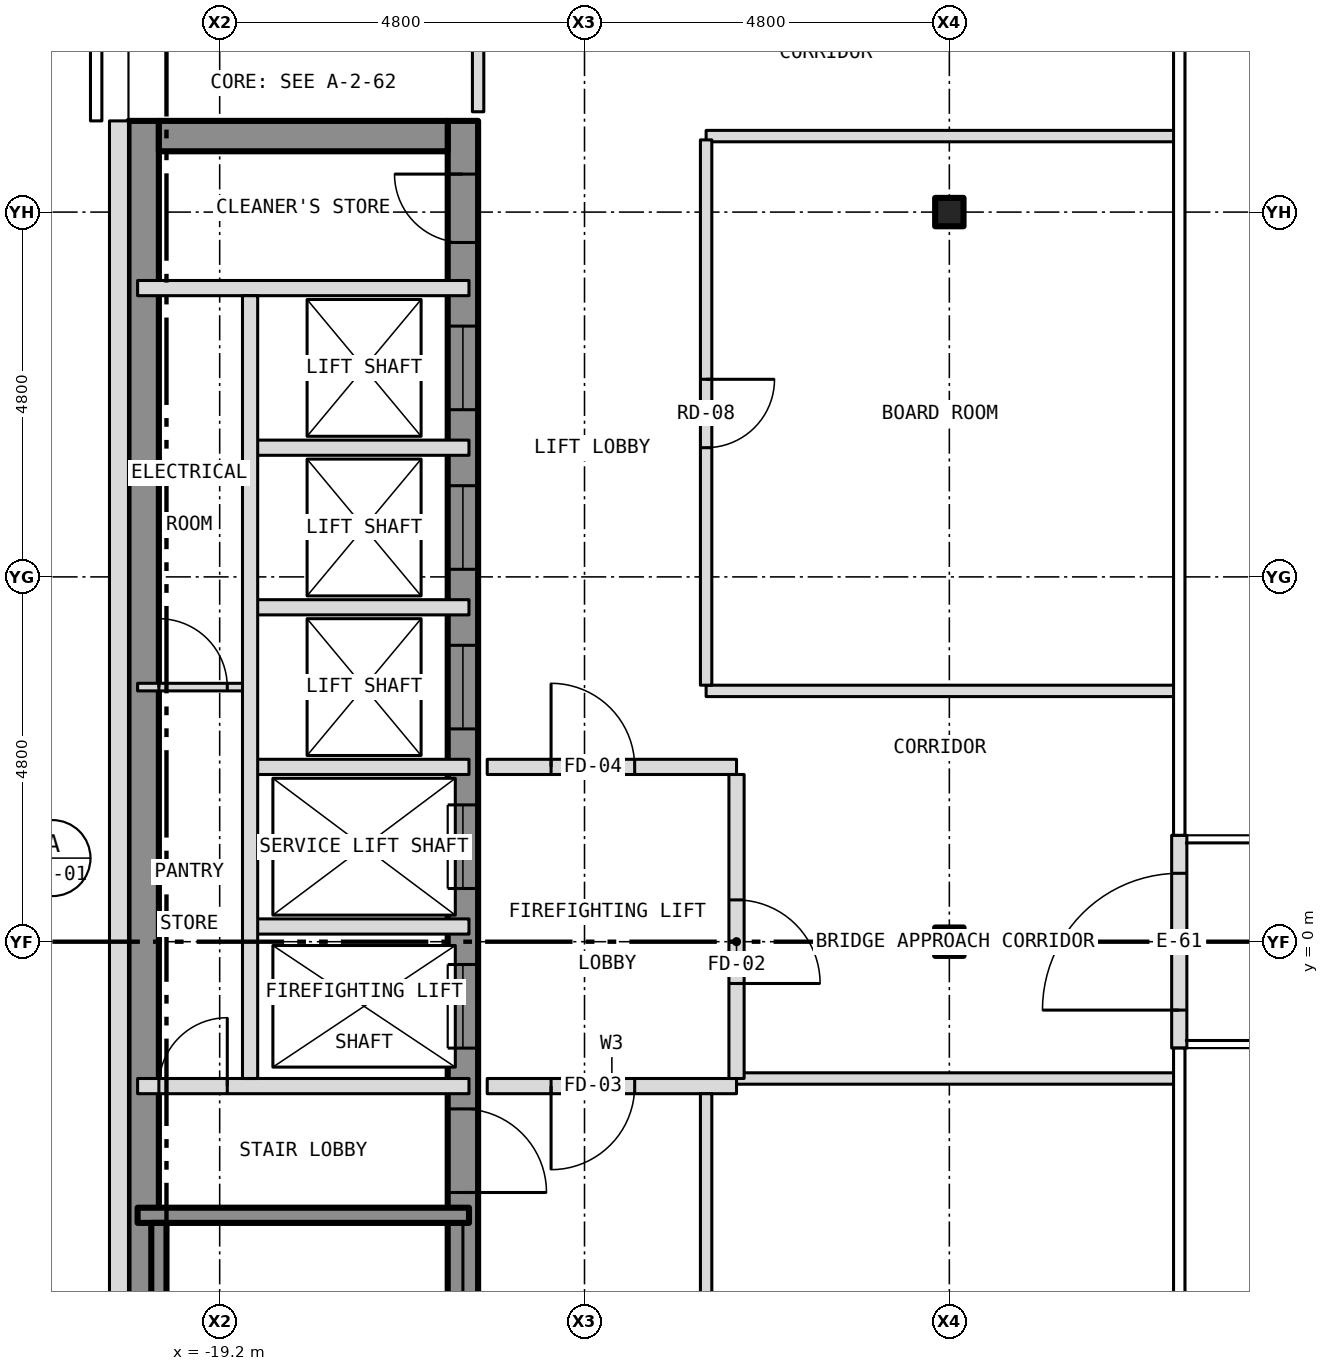
"""IFC4 building model, lengths in metres.
Left out: names, types, materials, properties, quantities, classifications, styles, units other than length and angle.
Written with IfcOpenShell. Run it as: python <this file> out.ifc"""

import sys

from ifc_helpers import new_model, si_unit, direction, frame, frame_2d, origin, origin_2d, place, context, subcontext, project, spatial, rectangle, i_section, extrude, element, fill, save


model = new_model("IFC4")
c1 = context("Model", 3, precision=1e-05, world=origin(), true_north=direction((0.0, 1.0)))
c2 = subcontext(c1, "Body", "Model", "MODEL_VIEW")
j1 = project(units=[si_unit("LENGTHUNIT", "METRE"), si_unit("PLANEANGLEUNIT", "RADIAN")], contexts=[c1])
p1 = place(None, origin())
s1 = spatial("IfcSite", under=j1, at=p1, CompositionType="ELEMENT")
p2 = place(p1, origin())
s2 = spatial("IfcBuilding", under=s1, at=p2, CompositionType="ELEMENT")
p3 = place(p2, frame((0.0, 0.0, 226.0)))
s3 = spatial("IfcBuildingStorey", under=s2, at=p3, CompositionType="ELEMENT", Elevation=226.0)
for number, where, z_axis, x_axis in (
    (1, (-9.6, 0.0, -0.15), (0.0, 0.0, 1.0), (1.0, 0.0, 0.0)),
    (2, (-9.6, 9.6, -0.15), (0.0, 0.0, 1.0), (1.0, 0.0, 0.0)),
):
    element("IfcColumn", number, at=place(p3, frame(where, z_axis=z_axis, x_axis=x_axis)), inside=s3, PredefinedType="COLUMN", context=c2, shape_type="SweptSolid", body=[
        extrude(i_section(OverallWidth=0.373, OverallDepth=0.373, WebThickness=0.016, FlangeThickness=0.026, at=origin_2d()), origin(), (0.0, 0.0, 1.0), 3.5),
    ])
p4 = place(p3, frame((-16.0, -10.8, 0.0), z_axis=(0.0, 0.0, 1.0), x_axis=(0.0, 1.0, 0.0)))
e3 = element("IfcWall", 3, at=p4, inside=s3, PredefinedType="SHEAR", context=c2, shape_type="SweptSolid", body=[
    extrude(rectangle(XDim=21.6, YDim=0.4, at=frame_2d((10.8, 0.0))), origin(), (0.0, 0.0, 1.0), 3.25),
])
p5 = place(p4, frame((9.4, 0.0, 0.0)))
e4 = element("IfcOpeningElement", 4, at=p5, cuts=e3, PredefinedType="OPENING", context=c2, shape_type="SweptSolid", body=[
    extrude(rectangle(XDim=1.1, YDim=2.1, at=frame_2d((0.55, 1.05))), frame((0.0, 0.212, 0.0), z_axis=(0.0, -1.0, 0.0), x_axis=(1.0, 0.0, 0.0)), (0.0, 0.0, 1.0), 0.424),
])
p6 = place(p4, frame((11.5, 0.0, 0.0)))
e5 = element("IfcOpeningElement", 5, at=p6, cuts=e3, PredefinedType="OPENING", context=c2, shape_type="SweptSolid", body=[
    extrude(rectangle(XDim=1.1, YDim=2.1, at=frame_2d((0.55, 1.05))), frame((0.0, 0.212, 0.0), z_axis=(0.0, -1.0, 0.0), x_axis=(1.0, 0.0, 0.0)), (0.0, 0.0, 1.0), 0.424),
])
p7 = place(p4, frame((13.6, 0.0, 0.0)))
e6 = element("IfcOpeningElement", 6, at=p7, cuts=e3, PredefinedType="OPENING", context=c2, shape_type="SweptSolid", body=[
    extrude(rectangle(XDim=1.1, YDim=2.1, at=frame_2d((0.55, 1.05))), frame((0.0, 0.212, 0.0), z_axis=(0.0, -1.0, 0.0), x_axis=(1.0, 0.0, 0.0)), (0.0, 0.0, 1.0), 0.424),
])
p8 = place(p4, frame((15.7, 0.0, 0.0)))
e7 = element("IfcOpeningElement", 7, at=p8, cuts=e3, PredefinedType="OPENING", context=c2, shape_type="SweptSolid", body=[
    extrude(rectangle(XDim=1.1, YDim=2.1, at=frame_2d((0.55, 1.05))), frame((0.0, 0.212, 0.0), z_axis=(0.0, -1.0, 0.0), x_axis=(1.0, 0.0, 0.0)), (0.0, 0.0, 1.0), 0.424),
])
p9 = place(p4, frame((17.8, 0.0, 0.0)))
e8 = element("IfcOpeningElement", 8, at=p9, cuts=e3, PredefinedType="OPENING", context=c2, shape_type="SweptSolid", body=[
    extrude(rectangle(XDim=1.1, YDim=2.1, at=frame_2d((0.55, 1.05))), frame((0.0, 0.212, 0.0), z_axis=(0.0, -1.0, 0.0), x_axis=(1.0, 0.0, 0.0)), (0.0, 0.0, 1.0), 0.424),
])
p10 = place(p4, frame((0.458, 0.0, 0.0)))
e9 = element("IfcOpeningElement", 9, at=p10, cuts=e3, PredefinedType="OPENING", context=c2, shape_type="SweptSolid", body=[
    extrude(rectangle(XDim=1.1, YDim=2.1, at=frame_2d((0.55, 1.05))), frame((0.0, 0.212, 0.0), z_axis=(0.0, -1.0, 0.0), x_axis=(1.0, 0.0, 0.0)), (0.0, 0.0, 1.0), 0.424),
])
p11 = place(p4, frame((7.5, 0.0, 0.0)))
e10 = element("IfcOpeningElement", 10, at=p11, cuts=e3, PredefinedType="OPENING", context=c2, shape_type="SweptSolid", body=[
    extrude(rectangle(XDim=1.1, YDim=2.1, at=frame_2d((0.55, 1.05))), frame((0.0, 0.212, 0.0), z_axis=(0.0, -1.0, 0.0), x_axis=(1.0, 0.0, 0.0)), (0.0, 0.0, 1.0), 0.424),
])
p12 = place(p4, frame((20.0, 0.0, 0.0)))
e11 = element("IfcOpeningElement", 11, at=p12, cuts=e3, PredefinedType="OPENING", context=c2, shape_type="SweptSolid", body=[
    extrude(rectangle(XDim=0.9, YDim=2.1, at=frame_2d((0.45, 1.05))), frame((0.0, 0.212, 0.0), z_axis=(0.0, -1.0, 0.0), x_axis=(1.0, 0.0, 0.0)), (0.0, 0.0, 1.0), 0.424),
])
p13 = place(p3, frame((-20.2, -10.8, 0.0), z_axis=(0.0, 0.0, 1.0), x_axis=(0.0, 1.0, 0.0)))
e12 = element("IfcWall", 12, at=p13, inside=s3, PredefinedType="SHEAR", context=c2, shape_type="SweptSolid", body=[
    extrude(rectangle(XDim=21.6, YDim=0.4, at=frame_2d((10.8, 0.0))), origin(), (0.0, 0.0, 1.0), 3.25),
])
p14 = place(p3, frame((-20.0, 10.6, 0.0), z_axis=(0.0, 0.0, 1.0), x_axis=(1.0, 0.0, 0.0)))
e13 = element("IfcWall", 13, at=p14, inside=s3, PredefinedType="SHEAR", context=c2, shape_type="SweptSolid", body=[
    extrude(rectangle(XDim=3.8, YDim=0.4, at=frame_2d((1.9, 0.0))), origin(), (0.0, 0.0, 1.0), 3.25),
])
p15 = place(p3, frame((-20.525, 10.8, 0.0), z_axis=(0.0, 0.0, 1.0), x_axis=(0.0, -1.0, 0.0)))
e14 = element("IfcWall", 14, at=p15, inside=s3, PredefinedType="SOLIDWALL", context=c2, shape_type="SweptSolid", body=[
    extrude(rectangle(XDim=21.6, YDim=0.25, at=frame_2d((10.8, 0.0))), origin(), (0.0, 0.0, 1.0), 3.5),
])
p16 = place(p15, frame((18.05, 0.0, 1.0)))
e15 = element("IfcOpeningElement", 15, at=p16, cuts=e14, PredefinedType="OPENING", context=c2, shape_type="SweptSolid", body=[
    extrude(rectangle(XDim=0.6, YDim=1.5, at=frame_2d((0.3, 0.75))), frame((0.0, 0.137, 0.0), z_axis=(0.0, -1.0, 0.0), x_axis=(1.0, 0.0, 0.0)), (0.0, 0.0, 1.0), 0.274),
])
p17 = place(p3, frame((-6.575, -1.4, 0.0), z_axis=(0.0, 0.0, 1.0), x_axis=(0.0, 1.0, 0.0)))
e16 = element("IfcWall", 16, at=p17, inside=s3, PredefinedType="SOLIDWALL", context=c2, shape_type="SweptSolid", body=[
    extrude(rectangle(XDim=2.8, YDim=0.2, at=frame_2d((1.4, 0.0))), origin(), (0.0, 0.0, 1.0), 3.5),
])
p18 = place(p17, frame((0.5, 0.0, 0.0)))
e17 = element("IfcOpeningElement", 17, at=p18, cuts=e16, PredefinedType="OPENING", context=c2, shape_type="SweptSolid", body=[
    extrude(rectangle(XDim=1.8, YDim=2.1, at=frame_2d((0.9, 1.05))), frame((0.0, 0.112, 0.0), z_axis=(0.0, -1.0, 0.0), x_axis=(1.0, 0.0, 0.0)), (0.0, 0.0, 1.0), 0.224),
])
p19 = place(p3, frame((-20.28, -3.6, 0.0), z_axis=(0.0, 0.0, 1.0), x_axis=(1.0, 0.0, 0.0)))
e18 = element("IfcWall", 18, at=p19, inside=s3, PredefinedType="SHEAR", context=c2, shape_type="SweptSolid", body=[
    extrude(rectangle(XDim=4.36, YDim=0.2, at=frame_2d((2.18, 0.0))), origin(), (0.0, 0.0, 1.0), 3.25),
])
p20 = place(p3, frame((-20.28, -1.9, 0.0), z_axis=(0.0, 0.0, 1.0), x_axis=(1.0, 0.0, 0.0)))
e19 = element("IfcWall", 19, at=p20, inside=s3, PredefinedType="PARTITIONING", context=c2, shape_type="SweptSolid", body=[
    extrude(rectangle(XDim=4.36, YDim=0.2, at=frame_2d((2.18, 0.0))), origin(), (0.0, 0.0, 1.0), 3.25),
])
p21 = place(p20, frame((0.28, 0.0, 0.0)))
e20 = element("IfcOpeningElement", 20, at=p21, cuts=e19, PredefinedType="OPENING", context=c2, shape_type="SweptSolid", body=[
    extrude(rectangle(XDim=0.9, YDim=2.1, at=frame_2d((0.45, 1.05))), frame((0.0, 0.112, 0.0), z_axis=(0.0, -1.0, 0.0), x_axis=(1.0, 0.0, 0.0)), (0.0, 0.0, 1.0), 0.224),
])
p22 = place(p3, frame((-15.68, -1.9, 0.0), z_axis=(0.0, 0.0, 1.0), x_axis=(1.0, 0.0, 0.0)))
e21 = element("IfcWall", 21, at=p22, inside=s3, PredefinedType="PARTITIONING", context=c2, shape_type="SweptSolid", body=[
    extrude(rectangle(XDim=3.28, YDim=0.2, at=frame_2d((1.64, 0.0))), origin(), (0.0, 0.0, 1.0), 3.35),
])
p23 = place(p22, frame((0.84, 0.0, 0.0)))
e22 = element("IfcOpeningElement", 22, at=p23, cuts=e21, PredefinedType="OPENING", context=c2, shape_type="SweptSolid", body=[
    extrude(rectangle(XDim=1.1, YDim=2.1, at=frame_2d((0.55, 1.05))), frame((0.0, 0.112, 0.0), z_axis=(0.0, -1.0, 0.0), x_axis=(1.0, 0.0, 0.0)), (0.0, 0.0, 1.0), 0.224),
])
p24 = place(p3, frame((-12.4, -1.8, 0.0), z_axis=(0.0, 0.0, 1.0), x_axis=(1.0, 0.0, 0.0)))
e23 = element("IfcWall", 23, at=p24, inside=s3, PredefinedType="PARTITIONING", context=c2, shape_type="SweptSolid", body=[
    extrude(rectangle(XDim=5.78, YDim=0.15, at=frame_2d((2.89, 0.0))), origin(), (0.0, 0.0, 1.0), 3.35),
])
for number, where, z_axis, x_axis in (
    (24, (-18.8, 0.2, 0.0), (0.0, 0.0, 1.0), (1.0, 0.0, 0.0)),
    (25, (-18.8, 2.3, 0.0), (0.0, 0.0, 1.0), (1.0, 0.0, 0.0)),
):
    element("IfcWall", number, at=place(p3, frame(where, z_axis=z_axis, x_axis=x_axis)), inside=s3, PredefinedType="PARTITIONING", context=c2, shape_type="SweptSolid", body=[
        extrude(rectangle(XDim=2.88, YDim=0.2, at=frame_2d((1.44, 0.0))), origin(), (0.0, 0.0, 1.0), 3.25),
    ])
p25 = place(p3, frame((-15.68, 2.3, 0.0), z_axis=(0.0, 0.0, 1.0), x_axis=(1.0, 0.0, 0.0)))
e26 = element("IfcWall", 26, at=p25, inside=s3, PredefinedType="PARTITIONING", context=c2, shape_type="SweptSolid", body=[
    extrude(rectangle(XDim=3.28, YDim=0.2, at=frame_2d((1.64, 0.0))), origin(), (0.0, 0.0, 1.0), 3.35),
])
p26 = place(p25, frame((0.84, 0.0, 0.0)))
e27 = element("IfcOpeningElement", 27, at=p26, cuts=e26, PredefinedType="OPENING", context=c2, shape_type="SweptSolid", body=[
    extrude(rectangle(XDim=1.1, YDim=2.1, at=frame_2d((0.55, 1.05))), frame((0.0, 0.112, 0.0), z_axis=(0.0, -1.0, 0.0), x_axis=(1.0, 0.0, 0.0)), (0.0, 0.0, 1.0), 0.224),
])
p27 = place(p3, frame((-12.8, 3.3, 0.0), z_axis=(0.0, 0.0, 1.0), x_axis=(1.0, 0.0, 0.0)))
e28 = element("IfcWall", 28, at=p27, inside=s3, PredefinedType="PARTITIONING", context=c2, shape_type="SweptSolid", body=[
    extrude(rectangle(XDim=6.18, YDim=0.15, at=frame_2d((3.09, 0.0))), origin(), (0.0, 0.0, 1.0), 3.35),
])
p28 = place(p3, frame((-20.28, 3.35, 0.0), z_axis=(0.0, 0.0, 1.0), x_axis=(1.0, 0.0, 0.0)))
e29 = element("IfcWall", 29, at=p28, inside=s3, PredefinedType="PARTITIONING", context=c2, shape_type="SweptSolid", body=[
    extrude(rectangle(XDim=1.48, YDim=0.1, at=frame_2d((0.74, 0.0))), origin(), (0.0, 0.0, 1.0), 3.25),
])
p29 = place(p28, frame((0.28, 0.0, 0.0)))
e30 = element("IfcOpeningElement", 30, at=p29, cuts=e29, PredefinedType="OPENING", context=c2, shape_type="SweptSolid", body=[
    extrude(rectangle(XDim=0.9, YDim=2.1, at=frame_2d((0.45, 1.05))), frame((0.0, 0.062, 0.0), z_axis=(0.0, -1.0, 0.0), x_axis=(1.0, 0.0, 0.0)), (0.0, 0.0, 1.0), 0.124),
])
for number, where, z_axis, x_axis in (
    (31, (-18.8, 4.4, 0.0), (0.0, 0.0, 1.0), (1.0, 0.0, 0.0)),
    (32, (-18.8, 6.5, 0.0), (0.0, 0.0, 1.0), (1.0, 0.0, 0.0)),
):
    element("IfcWall", number, at=place(p3, frame(where, z_axis=z_axis, x_axis=x_axis)), inside=s3, PredefinedType="PARTITIONING", context=c2, shape_type="SweptSolid", body=[
        extrude(rectangle(XDim=2.88, YDim=0.2, at=frame_2d((1.44, 0.0))), origin(), (0.0, 0.0, 1.0), 3.25),
    ])
p30 = place(p3, frame((-20.28, 8.6, 0.0), z_axis=(0.0, 0.0, 1.0), x_axis=(1.0, 0.0, 0.0)))
e33 = element("IfcWall", 33, at=p30, inside=s3, PredefinedType="PARTITIONING", context=c2, shape_type="SweptSolid", body=[
    extrude(rectangle(XDim=4.36, YDim=0.2, at=frame_2d((2.18, 0.0))), origin(), (0.0, 0.0, 1.0), 3.25),
])
p31 = place(p3, frame((-12.8, 10.6, 0.0), z_axis=(0.0, 0.0, 1.0), x_axis=(1.0, 0.0, 0.0)))
e34 = element("IfcWall", 34, at=p31, inside=s3, PredefinedType="PARTITIONING", context=c2, shape_type="SweptSolid", body=[
    extrude(rectangle(XDim=6.18, YDim=0.15, at=frame_2d((3.09, 0.0))), origin(), (0.0, 0.0, 1.0), 3.35),
])
p32 = place(p3, frame((-20.0, -10.68, 0.0), z_axis=(0.0, 0.0, 1.0), x_axis=(0.0, 1.0, 0.0)))
e35 = element("IfcWall", 35, at=p32, inside=s3, PredefinedType="SHEAR", context=c2, shape_type="SweptSolid", body=[
    extrude(rectangle(XDim=6.98, YDim=0.2, at=frame_2d((3.49, 0.0))), origin(), (0.0, 0.0, 1.0), 3.25),
])
p33 = place(p3, frame((-18.8, -1.8, 0.0), z_axis=(0.0, 0.0, 1.0), x_axis=(0.0, 1.0, 0.0)))
e36 = element("IfcWall", 36, at=p33, inside=s3, PredefinedType="PARTITIONING", context=c2, shape_type="SweptSolid", body=[
    extrude(rectangle(XDim=10.3, YDim=0.2, at=frame_2d((5.15, 0.0))), origin(), (0.0, 0.0, 1.0), 3.25),
])
p34 = place(p3, frame((-15.8, 10.92, 0.0), z_axis=(0.0, 0.0, 1.0), x_axis=(0.0, 1.0, 0.0)))
e37 = element("IfcWall", 37, at=p34, inside=s3, PredefinedType="PARTITIONING", context=c2, shape_type="SweptSolid", body=[
    extrude(rectangle(XDim=1.805, YDim=0.15, at=frame_2d((0.903, 0.0))), origin(), (0.0, 0.0, 1.0), 3.35),
])
p35 = place(p3, frame((-12.8, -10.525, 0.0), z_axis=(0.0, 0.0, 1.0), x_axis=(0.0, 1.0, 0.0)))
e38 = element("IfcWall", 38, at=p35, inside=s3, PredefinedType="PARTITIONING", context=c2, shape_type="SweptSolid", body=[
    extrude(rectangle(XDim=8.525, YDim=0.15, at=frame_2d((4.262, 0.0))), origin(), (0.0, 0.0, 1.0), 3.35),
])
p36 = place(p35, frame((3.825, 0.0, 0.0)))
e39 = element("IfcOpeningElement", 39, at=p36, cuts=e38, PredefinedType="OPENING", context=c2, shape_type="SweptSolid", body=[
    extrude(rectangle(XDim=0.9, YDim=2.1, at=frame_2d((0.45, 1.05))), frame((0.0, 0.087, 0.0), z_axis=(0.0, -1.0, 0.0), x_axis=(1.0, 0.0, 0.0)), (0.0, 0.0, 1.0), 0.174),
])
p37 = place(p3, frame((-12.8, 3.375, 0.0), z_axis=(0.0, 0.0, 1.0), x_axis=(0.0, 1.0, 0.0)))
e40 = element("IfcWall", 40, at=p37, inside=s3, PredefinedType="PARTITIONING", context=c2, shape_type="SweptSolid", body=[
    extrude(rectangle(XDim=7.175, YDim=0.15, at=frame_2d((3.587, 0.0))), origin(), (0.0, 0.0, 1.0), 3.35),
])
p38 = place(p37, frame((3.125, 0.0, 0.0)))
e41 = element("IfcOpeningElement", 41, at=p38, cuts=e40, PredefinedType="OPENING", context=c2, shape_type="SweptSolid", body=[
    extrude(rectangle(XDim=0.9, YDim=2.1, at=frame_2d((0.45, 1.05))), frame((0.0, 0.087, 0.0), z_axis=(0.0, -1.0, 0.0), x_axis=(1.0, 0.0, 0.0)), (0.0, 0.0, 1.0), 0.174),
])
p39 = place(p3, frame((-12.4, -1.8, 0.0), z_axis=(0.0, 0.0, 1.0), x_axis=(0.0, 1.0, 0.0)))
e42 = element("IfcWall", 42, at=p39, inside=s3, PredefinedType="PARTITIONING", context=c2, shape_type="SweptSolid", body=[
    extrude(rectangle(XDim=4.0, YDim=0.2, at=frame_2d((2.0, 0.0))), origin(), (0.0, 0.0, 1.0), 3.35),
])
p40 = place(p39, frame((1.25, 0.0, 0.0)))
e43 = element("IfcOpeningElement", 43, at=p40, cuts=e42, PredefinedType="OPENING", context=c2, shape_type="SweptSolid", body=[
    extrude(rectangle(XDim=1.1, YDim=2.1, at=frame_2d((0.55, 1.05))), frame((0.0, 0.112, 0.0), z_axis=(0.0, -1.0, 0.0), x_axis=(1.0, 0.0, 0.0)), (0.0, 0.0, 1.0), 0.224),
])
p41 = place(p18, origin())
e44 = element("IfcDoor", 44, at=p41, inside=s3, OperationType="DOUBLE_DOOR_DOUBLE_SWING", PredefinedType="DOOR", context=c2, shape_type="SweptSolid", body=[
    extrude(rectangle(XDim=1.8, YDim=2.1, at=frame_2d((0.9, 1.05))), frame((0.0, 0.025, 0.0), z_axis=(0.0, -1.0, 0.0), x_axis=(1.0, 0.0, 0.0)), (0.0, 0.0, 1.0), 0.05),
])
fill(e17, e44)
p42 = place(p5, origin())
e45 = element("IfcDoor", 45, at=p42, inside=s3, OperationType="SLIDING_TO_LEFT", PredefinedType="DOOR", context=c2, shape_type="SweptSolid", body=[
    extrude(rectangle(XDim=1.1, YDim=2.1, at=frame_2d((0.55, 1.05))), frame((0.0, 0.025, 0.0), z_axis=(0.0, -1.0, 0.0), x_axis=(1.0, 0.0, 0.0)), (0.0, 0.0, 1.0), 0.05),
])
fill(e4, e45)
p43 = place(p6, origin())
e46 = element("IfcDoor", 46, at=p43, inside=s3, OperationType="SLIDING_TO_LEFT", PredefinedType="DOOR", context=c2, shape_type="SweptSolid", body=[
    extrude(rectangle(XDim=1.1, YDim=2.1, at=frame_2d((0.55, 1.05))), frame((0.0, 0.025, 0.0), z_axis=(0.0, -1.0, 0.0), x_axis=(1.0, 0.0, 0.0)), (0.0, 0.0, 1.0), 0.05),
])
fill(e5, e46)
p44 = place(p7, origin())
e47 = element("IfcDoor", 47, at=p44, inside=s3, OperationType="SLIDING_TO_LEFT", PredefinedType="DOOR", context=c2, shape_type="SweptSolid", body=[
    extrude(rectangle(XDim=1.1, YDim=2.1, at=frame_2d((0.55, 1.05))), frame((0.0, 0.025, 0.0), z_axis=(0.0, -1.0, 0.0), x_axis=(1.0, 0.0, 0.0)), (0.0, 0.0, 1.0), 0.05),
])
fill(e6, e47)
p45 = place(p8, origin())
e48 = element("IfcDoor", 48, at=p45, inside=s3, OperationType="SLIDING_TO_LEFT", PredefinedType="DOOR", context=c2, shape_type="SweptSolid", body=[
    extrude(rectangle(XDim=1.1, YDim=2.1, at=frame_2d((0.55, 1.05))), frame((0.0, 0.025, 0.0), z_axis=(0.0, -1.0, 0.0), x_axis=(1.0, 0.0, 0.0)), (0.0, 0.0, 1.0), 0.05),
])
fill(e7, e48)
p46 = place(p9, origin())
e49 = element("IfcDoor", 49, at=p46, inside=s3, OperationType="SLIDING_TO_LEFT", PredefinedType="DOOR", context=c2, shape_type="SweptSolid", body=[
    extrude(rectangle(XDim=1.1, YDim=2.1, at=frame_2d((0.55, 1.05))), frame((0.0, 0.025, 0.0), z_axis=(0.0, -1.0, 0.0), x_axis=(1.0, 0.0, 0.0)), (0.0, 0.0, 1.0), 0.05),
])
fill(e8, e49)
p47 = place(p11, origin())
e50 = element("IfcDoor", 50, at=p47, inside=s3, OperationType="SINGLE_SWING_LEFT", PredefinedType="DOOR", context=c2, shape_type="SweptSolid", body=[
    extrude(rectangle(XDim=1.1, YDim=2.1, at=frame_2d((0.55, 1.05))), frame((0.0, 0.025, 0.0), z_axis=(0.0, -1.0, 0.0), x_axis=(1.0, 0.0, 0.0)), (0.0, 0.0, 1.0), 0.05),
])
fill(e10, e50)
p48 = place(p12, origin())
e51 = element("IfcDoor", 51, at=p48, inside=s3, OperationType="SINGLE_SWING_RIGHT", PredefinedType="DOOR", context=c2, shape_type="SweptSolid", body=[
    extrude(rectangle(XDim=0.9, YDim=2.1, at=frame_2d((0.45, 1.05))), frame((0.0, 0.025, 0.0), z_axis=(0.0, -1.0, 0.0), x_axis=(1.0, 0.0, 0.0)), (0.0, 0.0, 1.0), 0.05),
])
fill(e11, e51)
p49 = place(p21, origin())
e52 = element("IfcDoor", 52, at=p49, inside=s3, OperationType="SINGLE_SWING_RIGHT", PredefinedType="DOOR", context=c2, shape_type="SweptSolid", body=[
    extrude(rectangle(XDim=0.9, YDim=2.1, at=frame_2d((0.45, 1.05))), frame((0.0, 0.025, 0.0), z_axis=(0.0, -1.0, 0.0), x_axis=(1.0, 0.0, 0.0)), (0.0, 0.0, 1.0), 0.05),
])
fill(e20, e52)
p50 = place(p29, origin())
e53 = element("IfcDoor", 53, at=p50, inside=s3, OperationType="SINGLE_SWING_LEFT", PredefinedType="DOOR", context=c2, shape_type="SweptSolid", body=[
    extrude(rectangle(XDim=0.9, YDim=2.1, at=frame_2d((0.45, 1.05))), frame((0.0, 0.025, 0.0), z_axis=(0.0, -1.0, 0.0), x_axis=(1.0, 0.0, 0.0)), (0.0, 0.0, 1.0), 0.05),
])
fill(e30, e53)
p51 = place(p40, origin())
e54 = element("IfcDoor", 54, at=p51, inside=s3, OperationType="SINGLE_SWING_LEFT", PredefinedType="DOOR", context=c2, shape_type="SweptSolid", body=[
    extrude(rectangle(XDim=1.1, YDim=2.1, at=frame_2d((0.55, 1.05))), frame((0.0, 0.025, 0.0), z_axis=(0.0, -1.0, 0.0), x_axis=(1.0, 0.0, 0.0)), (0.0, 0.0, 1.0), 0.05),
])
fill(e43, e54)
p52 = place(p23, origin())
e55 = element("IfcDoor", 55, at=p52, inside=s3, OperationType="SINGLE_SWING_LEFT", PredefinedType="DOOR", context=c2, shape_type="SweptSolid", body=[
    extrude(rectangle(XDim=1.1, YDim=2.1, at=frame_2d((0.55, 1.05))), frame((0.0, 0.025, 0.0), z_axis=(0.0, -1.0, 0.0), x_axis=(1.0, 0.0, 0.0)), (0.0, 0.0, 1.0), 0.05),
])
fill(e22, e55)
p53 = place(p26, origin())
e56 = element("IfcDoor", 56, at=p53, inside=s3, OperationType="SINGLE_SWING_LEFT", PredefinedType="DOOR", context=c2, shape_type="SweptSolid", body=[
    extrude(rectangle(XDim=1.1, YDim=2.1, at=frame_2d((0.55, 1.05))), frame((0.0, 0.025, 0.0), z_axis=(0.0, -1.0, 0.0), x_axis=(1.0, 0.0, 0.0)), (0.0, 0.0, 1.0), 0.05),
])
fill(e27, e56)
p54 = place(p38, origin())
e57 = element("IfcDoor", 57, at=p54, inside=s3, OperationType="SINGLE_SWING_RIGHT", PredefinedType="DOOR", context=c2, shape_type="SweptSolid", body=[
    extrude(rectangle(XDim=0.9, YDim=2.1, at=frame_2d((0.45, 1.05))), frame((0.0, 0.025, 0.0), z_axis=(0.0, -1.0, 0.0), x_axis=(1.0, 0.0, 0.0)), (0.0, 0.0, 1.0), 0.05),
])
fill(e41, e57)
save(model, sys.argv[1])
